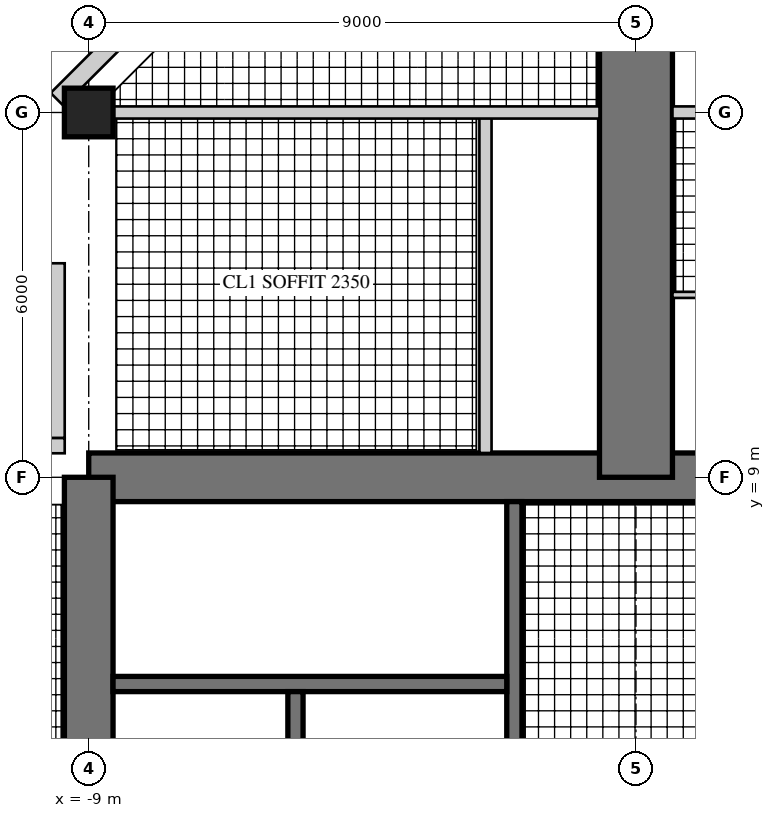
"""IFC4 building model, lengths in metres.
Left out: names, types, materials, properties, quantities, classifications, styles, units other than length and angle.
Written with IfcOpenShell. Run it as: python <this file> out.ifc"""

import sys

from ifc_helpers import new_model, si_unit, direction, frame, frame_2d, origin, origin_2d, place, context, subcontext, project, spatial, rectangle, hollow_rectangle, extrude, element, fill, save


model = new_model("IFC4")
c1 = context("Model", 3, precision=1e-05, world=origin(), true_north=direction((0.0, 1.0)))
c2 = subcontext(c1, "Body", "Model", "MODEL_VIEW")
j1 = project(units=[si_unit("LENGTHUNIT", "METRE"), si_unit("PLANEANGLEUNIT", "RADIAN")], contexts=[c1])
p1 = place(None, origin())
s1 = spatial("IfcSite", under=j1, at=p1, CompositionType="ELEMENT")
p2 = place(p1, origin())
s2 = spatial("IfcBuilding", under=s1, at=p2, CompositionType="ELEMENT")
p3 = place(p2, frame((0.0, 0.0, 242.5)))
s3 = spatial("IfcBuildingStorey", under=s2, at=p3, CompositionType="ELEMENT", Elevation=242.5)
p4 = place(p3, frame((9.0, 9.0, 0.0), z_axis=(0.0, 0.0, 1.0), x_axis=(-1.0, 0.0, 0.0)))
e1 = element("IfcWall", 1, at=p4, inside=s3, PredefinedType="SHEAR", context=c2, shape_type="SweptSolid", body=[
    extrude(rectangle(XDim=18.0, YDim=0.8, at=frame_2d((9.0, 0.0))), origin(), (0.0, 0.0, 1.0), 3.4),
])
p5 = place(p4, frame((9.8, 0.0, 0.0)))
e2 = element("IfcOpeningElement", 2, at=p5, cuts=e1, PredefinedType="OPENING", context=c2, shape_type="SweptSolid", body=[
    extrude(rectangle(XDim=1.0, YDim=2.4, at=frame_2d((0.5, 1.2))), frame((0.0, 0.41, 0.0), z_axis=(0.0, -1.0, 0.0), x_axis=(1.0, 0.0, 0.0)), (0.0, 0.0, 1.0), 0.82),
])
p6 = place(p3, frame((-9.0, 9.0, 0.0), z_axis=(0.0, 0.0, 1.0), x_axis=(0.0, -1.0, 0.0)))
e3 = element("IfcWall", 3, at=p6, inside=s3, PredefinedType="SHEAR", context=c2, shape_type="SweptSolid", body=[
    extrude(rectangle(XDim=18.0, YDim=0.8, at=frame_2d((9.0, 0.0))), origin(), (0.0, 0.0, 1.0), 3.4),
])
p7 = place(p6, frame((9.8, 0.0, 0.0)))
e4 = element("IfcOpeningElement", 4, at=p7, cuts=e3, PredefinedType="OPENING", context=c2, shape_type="SweptSolid", body=[
    extrude(rectangle(XDim=1.0, YDim=2.4, at=frame_2d((0.5, 1.2))), frame((0.0, 0.41, 0.0), z_axis=(0.0, -1.0, 0.0), x_axis=(1.0, 0.0, 0.0)), (0.0, 0.0, 1.0), 0.82),
])
p8 = place(p3, frame((-2.0, 1.675, 0.0), z_axis=(0.0, 0.0, 1.0), x_axis=(0.0, 1.0, 0.0)))
e5 = element("IfcWall", 5, at=p8, inside=s3, PredefinedType="SHEAR", context=c2, shape_type="SweptSolid", body=[
    extrude(rectangle(XDim=6.925, YDim=0.25, at=frame_2d((3.462, 0.0))), origin(), (0.0, 0.0, 1.0), 3.4),
])
p9 = place(p8, frame((0.725, 0.0, 0.0)))
e6 = element("IfcOpeningElement", 6, at=p9, cuts=e5, PredefinedType="OPENING", context=c2, shape_type="SweptSolid", body=[
    extrude(rectangle(XDim=1.0, YDim=2.1, at=frame_2d((0.5, 1.05))), frame((0.0, 0.135, 0.0), z_axis=(0.0, -1.0, 0.0), x_axis=(1.0, 0.0, 0.0)), (0.0, 0.0, 1.0), 0.27),
])
p10 = place(p3, frame((-2.125, 5.6, 0.0), z_axis=(0.0, 0.0, 1.0), x_axis=(-1.0, 0.0, 0.0)))
e7 = element("IfcWall", 7, at=p10, inside=s3, PredefinedType="SHEAR", context=c2, shape_type="SweptSolid", body=[
    extrude(rectangle(XDim=6.475, YDim=0.25, at=frame_2d((3.238, 0.0))), origin(), (0.0, 0.0, 1.0), 3.4),
])
p11 = place(p10, frame((0.175, 0.0, 0.0)))
e8 = element("IfcOpeningElement", 8, at=p11, cuts=e7, PredefinedType="OPENING", context=c2, shape_type="SweptSolid", body=[
    extrude(rectangle(XDim=1.0, YDim=2.1, at=frame_2d((0.5, 1.05))), frame((0.0, 0.135, 0.0), z_axis=(0.0, -1.0, 0.0), x_axis=(1.0, 0.0, 0.0)), (0.0, 0.0, 1.0), 0.27),
])
p12 = place(p3, frame((-5.6, 1.925, 0.0), z_axis=(0.0, 0.0, 1.0), x_axis=(0.0, 1.0, 0.0)))
e9 = element("IfcWall", 9, at=p12, inside=s3, PredefinedType="SHEAR", context=c2, shape_type="SweptSolid", body=[
    extrude(rectangle(XDim=3.55, YDim=0.25, at=frame_2d((1.775, 0.0))), origin(), (0.0, 0.0, 1.0), 3.4),
])
p13 = place(p12, frame((1.525, 0.0, 0.0)))
e10 = element("IfcOpeningElement", 10, at=p13, cuts=e9, PredefinedType="OPENING", context=c2, shape_type="SweptSolid", body=[
    extrude(rectangle(XDim=1.1, YDim=2.2, at=frame_2d((0.55, 1.1))), frame((0.0, 0.135, 0.0), z_axis=(0.0, -1.0, 0.0), x_axis=(1.0, 0.0, 0.0)), (0.0, 0.0, 1.0), 0.27),
])
p14 = place(p12, frame((0.075, 0.0, 0.0)))
e11 = element("IfcOpeningElement", 11, at=p14, cuts=e9, PredefinedType="OPENING", context=c2, shape_type="SweptSolid", body=[
    extrude(rectangle(XDim=0.8, YDim=2.1, at=frame_2d((0.4, 1.05))), frame((0.0, 0.135, 0.0), z_axis=(0.0, -1.0, 0.0), x_axis=(1.0, 0.0, 0.0)), (0.0, 0.0, 1.0), 0.27),
])
p15 = place(p3, frame((0.0, 9.0, 0.0), z_axis=(0.0, 0.0, 1.0), x_axis=(0.0, 1.0, 0.0)))
e12 = element("IfcWall", 12, at=p15, inside=s3, PredefinedType="SHEAR", context=c2, shape_type="SweptSolid", body=[
    extrude(rectangle(XDim=9.0, YDim=1.2, at=frame_2d((4.5, 0.0))), origin(), (0.0, 0.0, 1.0), 3.4),
])
p16 = place(p15, frame((3.8, 0.0, 0.0)))
e13 = element("IfcOpeningElement", 13, at=p16, cuts=e12, PredefinedType="OPENING", context=c2, shape_type="SweptSolid", body=[
    extrude(rectangle(XDim=1.0, YDim=2.15, at=frame_2d((0.5, 1.075))), frame((0.0, 0.61, 0.0), z_axis=(0.0, -1.0, 0.0), x_axis=(1.0, 0.0, 0.0)), (0.0, 0.0, 1.0), 1.22),
])
p17 = place(p15, frame((7.0, 0.0, 0.0)))
e14 = element("IfcOpeningElement", 14, at=p17, cuts=e12, PredefinedType="OPENING", context=c2, shape_type="SweptSolid", body=[
    extrude(rectangle(XDim=1.0, YDim=2.2, at=frame_2d((0.5, 1.1))), frame((0.0, 0.61, 0.0), z_axis=(0.0, -1.0, 0.0), x_axis=(1.0, 0.0, 0.0)), (0.0, 0.0, 1.0), 1.22),
])
p18 = place(p3, frame((-9.0, 15.0, 0.0), z_axis=(0.0, 0.0, 1.0), x_axis=(1.0, 0.0, 0.0)))
e15 = element("IfcColumn", 15, at=p18, inside=s3, PredefinedType="COLUMN", context=c2, shape_type="SweptSolid", body=[
    extrude(rectangle(XDim=0.8, YDim=0.8, at=origin_2d()), origin(), (0.0, 0.0, 1.0), 3.4),
])
p19 = place(p3, frame((-6.135, 18.6, 0.0), z_axis=(0.0, 0.0, 1.0), x_axis=(-0.707081278264, -0.707132283189, 0.0)))
e16 = element("IfcWall", 16, at=p19, inside=s3, PredefinedType="SOLIDWALL", context=c2, shape_type="SweptSolid", body=[
    extrude(rectangle(XDim=4.787, YDim=0.3, at=frame_2d((2.393, 0.0))), origin(), (0.0, 0.0, 1.0), 3.22),
])
p20 = place(p19, frame((1.943, 0.0, 0.3)))
e17 = element("IfcOpeningElement", 17, at=p20, cuts=e16, PredefinedType="OPENING", context=c2, shape_type="SweptSolid", body=[
    extrude(rectangle(XDim=0.9, YDim=2.4, at=frame_2d((0.45, 1.2))), frame((0.0, 0.16, 0.0), z_axis=(0.0, -1.0, 0.0), x_axis=(1.0, 0.0, 0.0)), (0.0, 0.0, 1.0), 0.32),
])
p21 = place(p3, frame((-9.52, 12.52, 0.0), z_axis=(0.0, 0.0, 1.0), x_axis=(0.0, -1.0, 0.0)))
e18 = element("IfcWall", 18, at=p21, inside=s3, PredefinedType="SOLIDWALL", context=c2, shape_type="SweptSolid", body=[
    extrude(rectangle(XDim=2.875, YDim=0.25, at=frame_2d((1.438, 0.0))), origin(), (0.0, 0.0, 1.0), 3.22),
])
p22 = place(p21, frame((0.6, 0.0, 0.0)))
e19 = element("IfcOpeningElement", 19, at=p22, cuts=e18, PredefinedType="OPENING", context=c2, shape_type="SweptSolid", body=[
    extrude(rectangle(XDim=1.0, YDim=2.2, at=frame_2d((0.5, 1.1))), frame((0.0, 0.135, 0.0), z_axis=(0.0, -1.0, 0.0), x_axis=(1.0, 0.0, 0.0)), (0.0, 0.0, 1.0), 0.27),
])
p23 = place(p3, frame((-9.395, 9.52, 0.0), z_axis=(0.0, 0.0, 1.0), x_axis=(-1.0, 0.0, 0.0)))
e20 = element("IfcWall", 20, at=p23, inside=s3, PredefinedType="SOLIDWALL", context=c2, shape_type="SweptSolid", body=[
    extrude(rectangle(XDim=3.125, YDim=0.25, at=frame_2d((1.562, 0.0))), origin(), (0.0, 0.0, 1.0), 3.22),
])
p24 = place(p23, frame((0.6, 0.0, 0.0)))
e21 = element("IfcOpeningElement", 21, at=p24, cuts=e20, PredefinedType="OPENING", context=c2, shape_type="SweptSolid", body=[
    extrude(rectangle(XDim=1.0, YDim=2.2, at=frame_2d((0.5, 1.1))), frame((0.0, 0.135, 0.0), z_axis=(0.0, -1.0, 0.0), x_axis=(1.0, 0.0, 0.0)), (0.0, 0.0, 1.0), 0.27),
])
p25 = place(p3, frame((9.395, 12.0, 0.0), z_axis=(0.0, 0.0, 1.0), x_axis=(-1.0, 0.0, 0.0)))
e22 = element("IfcWall", 22, at=p25, inside=s3, PredefinedType="PARTITIONING", context=c2, shape_type="SweptSolid", body=[
    extrude(rectangle(XDim=8.795, YDim=0.1, at=frame_2d((4.397, 0.0))), origin(), (0.0, 0.0, 1.0), 3.22),
])
p26 = place(p25, frame((5.245, 0.0, 0.0)))
e23 = element("IfcOpeningElement", 23, at=p26, cuts=e22, PredefinedType="OPENING", context=c2, shape_type="SweptSolid", body=[
    extrude(rectangle(XDim=0.9, YDim=2.1, at=frame_2d((0.45, 1.05))), frame((0.0, 0.06, 0.0), z_axis=(0.0, -1.0, 0.0), x_axis=(1.0, 0.0, 0.0)), (0.0, 0.0, 1.0), 0.12),
])
p27 = place(p25, frame((7.345, 0.0, 0.0)))
e24 = element("IfcOpeningElement", 24, at=p27, cuts=e22, PredefinedType="OPENING", context=c2, shape_type="SweptSolid", body=[
    extrude(rectangle(XDim=0.9, YDim=2.1, at=frame_2d((0.45, 1.05))), frame((0.0, 0.06, 0.0), z_axis=(0.0, -1.0, 0.0), x_axis=(1.0, 0.0, 0.0)), (0.0, 0.0, 1.0), 0.12),
])
p28 = place(p3, frame((-2.475, 9.4, 0.0), z_axis=(0.0, 0.0, 1.0), x_axis=(0.0, 1.0, 0.0)))
e25 = element("IfcWall", 25, at=p28, inside=s3, PredefinedType="SOLIDWALL", context=c2, shape_type="SweptSolid", body=[
    extrude(rectangle(XDim=5.6, YDim=0.2, at=frame_2d((2.8, 0.0))), origin(), (0.0, 0.0, 1.0), 3.22),
])
p29 = place(p28, frame((1.2, 0.0, 0.0)))
e26 = element("IfcOpeningElement", 26, at=p29, cuts=e25, PredefinedType="OPENING", context=c2, shape_type="SweptSolid", body=[
    extrude(rectangle(XDim=1.0, YDim=2.2, at=frame_2d((0.5, 1.1))), frame((0.0, 0.11, 0.0), z_axis=(0.0, -1.0, 0.0), x_axis=(1.0, 0.0, 0.0)), (0.0, 0.0, 1.0), 0.22),
])
p30 = place(p3, frame((8.6, 15.0, 0.0), z_axis=(0.0, 0.0, 1.0), x_axis=(-1.0, 0.0, 0.0)))
e27 = element("IfcWall", 27, at=p30, inside=s3, PredefinedType="SOLIDWALL", context=c2, shape_type="SweptSolid", body=[
    extrude(rectangle(XDim=8.0, YDim=0.2, at=frame_2d((4.0, 0.0))), origin(), (0.0, 0.0, 1.0), 2.52),
])
p31 = place(p3, frame((-0.6, 15.0, 0.0), z_axis=(0.0, 0.0, 1.0), x_axis=(-1.0, 0.0, 0.0)))
e28 = element("IfcWall", 28, at=p31, inside=s3, PredefinedType="SOLIDWALL", context=c2, shape_type="SweptSolid", body=[
    extrude(rectangle(XDim=8.0, YDim=0.2, at=frame_2d((4.0, 0.0))), origin(), (0.0, 0.0, 1.0), 2.52),
])
p32 = place(p31, frame((0.35, 0.0, 0.0)))
e29 = element("IfcOpeningElement", 29, at=p32, cuts=e28, PredefinedType="OPENING", context=c2, shape_type="SweptSolid", body=[
    extrude(rectangle(XDim=1.0, YDim=2.2, at=frame_2d((0.5, 1.1))), frame((0.0, 0.11, 0.0), z_axis=(0.0, -1.0, 0.0), x_axis=(1.0, 0.0, 0.0)), (0.0, 0.0, 1.0), 0.22),
])
p33 = place(p22, origin())
e30 = element("IfcDoor", 30, at=p33, inside=s3, OperationType="SINGLE_SWING_RIGHT", PredefinedType="DOOR", context=c2, shape_type="SweptSolid", body=[
    extrude(hollow_rectangle(XDim=1.0, YDim=2.2, WallThickness=0.06, at=frame_2d((0.5, 1.1))), frame((0.0, 0.025, 0.0), z_axis=(0.0, -1.0, 0.0), x_axis=(1.0, 0.0, 0.0)), (0.0, 0.0, 1.0), 0.05),
    extrude(rectangle(XDim=0.879, YDim=2.079, at=frame_2d((0.5, 1.1))), frame((0.0, 0.025, 0.0), z_axis=(0.0, -1.0, 0.0), x_axis=(1.0, 0.0, 0.0)), (0.0, 0.0, 1.0), 0.05),
])
fill(e19, e30)
p34 = place(p29, origin())
e31 = element("IfcDoor", 31, at=p34, inside=s3, OperationType="SINGLE_SWING_LEFT", PredefinedType="DOOR", context=c2, shape_type="SweptSolid", body=[
    extrude(rectangle(XDim=1.0, YDim=2.2, at=frame_2d((0.5, 1.1))), frame((0.0, 0.025, 0.0), z_axis=(0.0, -1.0, 0.0), x_axis=(1.0, 0.0, 0.0)), (0.0, 0.0, 1.0), 0.05),
])
fill(e26, e31)
p35 = place(p32, frame((1.0, 0.0, 0.0), z_axis=(0.0, 0.0, 1.0), x_axis=(-1.0, 0.0, 0.0)))
e32 = element("IfcDoor", 32, at=p35, inside=s3, OperationType="SINGLE_SWING_RIGHT", PredefinedType="DOOR", context=c2, shape_type="SweptSolid", body=[
    extrude(rectangle(XDim=1.0, YDim=2.2, at=frame_2d((0.5, 1.1))), frame((0.0, 0.025, 0.0), z_axis=(0.0, -1.0, 0.0), x_axis=(1.0, 0.0, 0.0)), (0.0, 0.0, 1.0), 0.05),
])
fill(e29, e32)
p36 = place(p16, frame((1.0, 0.0, 0.0), z_axis=(0.0, 0.0, 1.0), x_axis=(-1.0, 0.0, 0.0)))
e33 = element("IfcDoor", 33, at=p36, inside=s3, OperationType="SINGLE_SWING_RIGHT", PredefinedType="DOOR", context=c2, shape_type="SweptSolid", body=[
    extrude(rectangle(XDim=1.0, YDim=2.15, at=frame_2d((0.5, 1.075))), frame((0.0, 0.025, 0.0), z_axis=(0.0, -1.0, 0.0), x_axis=(1.0, 0.0, 0.0)), (0.0, 0.0, 1.0), 0.05),
])
fill(e13, e33)
p37 = place(p5, origin())
e34 = element("IfcDoor", 34, at=p37, inside=s3, OperationType="SINGLE_SWING_RIGHT", PredefinedType="DOOR", context=c2, shape_type="SweptSolid", body=[
    extrude(rectangle(XDim=1.0, YDim=2.4, at=frame_2d((0.5, 1.2))), frame((0.0, 0.055, 0.0), z_axis=(0.0, -1.0, 0.0), x_axis=(1.0, 0.0, 0.0)), (0.0, 0.0, 1.0), 0.05),
])
fill(e2, e34)
p38 = place(p11, frame((1.0, 0.0, 0.0), z_axis=(0.0, 0.0, 1.0), x_axis=(-1.0, 0.0, 0.0)))
e35 = element("IfcDoor", 35, at=p38, inside=s3, OperationType="SINGLE_SWING_RIGHT", PredefinedType="DOOR", context=c2, shape_type="SweptSolid", body=[
    extrude(rectangle(XDim=1.0, YDim=2.1, at=frame_2d((0.5, 1.05))), frame((0.0, 0.025, 0.0), z_axis=(0.0, -1.0, 0.0), x_axis=(1.0, 0.0, 0.0)), (0.0, 0.0, 1.0), 0.05),
])
fill(e8, e35)
save(model, sys.argv[1])
